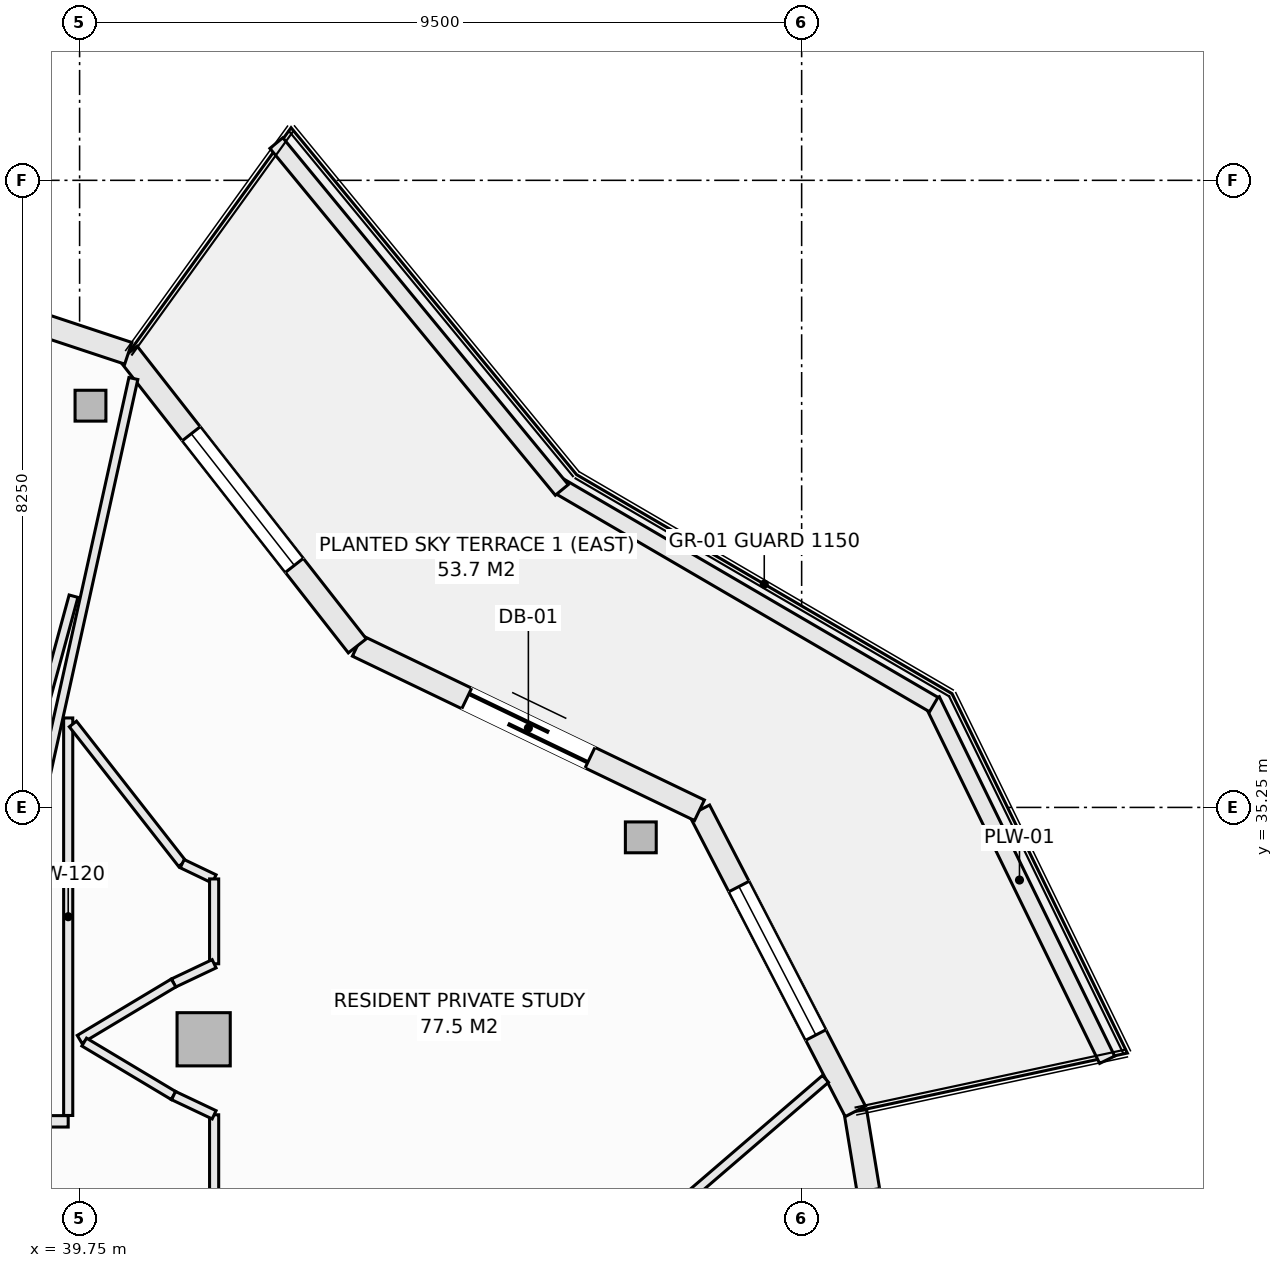
"""IFC4 building model, lengths in metres.
Left out: names, types, materials, properties, quantities, classifications, styles, units other than length and angle.
Written with IfcOpenShell. Run it as: python <this file> out.ifc"""

import sys

from ifc_helpers import new_model, si_unit, direction, frame, frame_2d, origin, origin_2d, place, context, subcontext, project, spatial, rectangle, hollow_rectangle, extrude, element, fill, save


model = new_model("IFC4")
c1 = context("Model", 3, precision=1e-05, world=origin(), true_north=direction((0.0, 1.0)))
c2 = subcontext(c1, "Body", "Model", "MODEL_VIEW")
j1 = project(units=[si_unit("LENGTHUNIT", "METRE"), si_unit("PLANEANGLEUNIT", "RADIAN")], contexts=[c1])
p1 = place(None, origin())
s1 = spatial("IfcSite", under=j1, at=p1, CompositionType="ELEMENT")
p2 = place(p1, origin())
s2 = spatial("IfcBuilding", under=s1, at=p2, CompositionType="ELEMENT")
p3 = place(p2, frame((0.0, 0.0, 259.1)))
s3 = spatial("IfcBuildingStorey", under=s2, at=p3, CompositionType="ELEMENT", Elevation=259.1)
for number, where, z_axis, x_axis in (
    (1, (47.134, 34.856, -0.27), (0.0, 0.0, 1.0), (1.0, 0.0, 0.0)),
    (2, (39.893, 40.535, -0.27), (0.0, 0.0, 1.0), (1.0, 0.0, 0.0)),
):
    element("IfcColumn", number, at=place(p3, frame(where, z_axis=z_axis, x_axis=x_axis)), inside=s3, PredefinedType="COLUMN", context=c2, shape_type="SweptSolid", body=[
        extrude(hollow_rectangle(XDim=0.406, YDim=0.406, WallThickness=0.016, at=origin_2d()), origin(), (0.0, 0.0, 1.0), 3.3),
    ])
p4 = place(p3, frame((41.382, 32.199, -0.27), z_axis=(0.0, 0.0, 1.0), x_axis=(1.0, 0.0, 0.0)))
e3 = element("IfcColumn", 3, at=p4, inside=s3, PredefinedType="COLUMN", context=c2, shape_type="SweptSolid", body=[
    extrude(rectangle(XDim=0.7, YDim=0.7, at=origin_2d()), origin(), (0.0, 0.0, 1.0), 3.3),
])
p5 = place(p3, frame((49.957, 31.251, 0.0), z_axis=(0.0, 0.0, 1.0), x_axis=(0.162404622434, -0.98672424649, 0.0)))
e4 = element("IfcWall", 4, at=p5, inside=s3, PredefinedType="SOLIDWALL", context=c2, shape_type="SweptSolid", body=[
    extrude(rectangle(XDim=4.308, YDim=0.3, at=frame_2d((2.154, 0.0))), origin(), (0.0, 0.0, 1.0), 2.605),
])
p6 = place(p5, frame((1.054, 0.0, 0.72)))
e5 = element("IfcOpeningElement", 5, at=p6, cuts=e4, PredefinedType="OPENING", context=c2, shape_type="SweptSolid", body=[
    extrude(rectangle(XDim=2.2, YDim=1.65, at=frame_2d((1.1, 0.825))), frame((0.0, 0.16, 0.0), z_axis=(0.0, -1.0, 0.0), x_axis=(1.0, 0.0, 0.0)), (0.0, 0.0, 1.0), 0.32),
])
p7 = place(p3, frame((47.906, 35.212, 0.0), z_axis=(0.0, 0.0, 1.0), x_axis=(0.459801070243, -0.888021945564, 0.0)))
e6 = element("IfcWall", 6, at=p7, inside=s3, PredefinedType="SOLIDWALL", context=c2, shape_type="SweptSolid", body=[
    extrude(rectangle(XDim=4.461, YDim=0.3, at=frame_2d((2.23, 0.0))), origin(), (0.0, 0.0, 1.0), 2.605),
])
p8 = place(p7, frame((1.13, 0.0, 0.72)))
e7 = element("IfcOpeningElement", 7, at=p8, cuts=e6, PredefinedType="OPENING", context=c2, shape_type="SweptSolid", body=[
    extrude(rectangle(XDim=2.2, YDim=1.65, at=frame_2d((1.1, 0.825))), frame((0.0, 0.16, 0.0), z_axis=(0.0, -1.0, 0.0), x_axis=(1.0, 0.0, 0.0)), (0.0, 0.0, 1.0), 0.32),
])
p9 = place(p3, frame((43.404, 37.375, 0.0), z_axis=(0.0, 0.0, 1.0), x_axis=(0.901346013132, -0.433099716706, 0.0)))
e8 = element("IfcWall", 8, at=p9, inside=s3, PredefinedType="SOLIDWALL", context=c2, shape_type="SweptSolid", body=[
    extrude(rectangle(XDim=4.994, YDim=0.3, at=frame_2d((2.497, 0.0))), origin(), (0.0, 0.0, 1.0), 2.605),
])
p10 = place(p9, frame((1.597, 0.0, 0.0)))
e9 = element("IfcOpeningElement", 9, at=p10, cuts=e8, PredefinedType="OPENING", context=c2, shape_type="SweptSolid", body=[
    extrude(rectangle(XDim=1.8, YDim=2.25, at=frame_2d((0.9, 1.125))), frame((0.0, 0.16, 0.0), z_axis=(0.0, -1.0, 0.0), x_axis=(1.0, 0.0, 0.0)), (0.0, 0.0, 1.0), 0.32),
])
p11 = place(p3, frame((40.391, 41.225, 0.0), z_axis=(0.0, 0.0, 1.0), x_axis=(0.616413297421, -0.78742278781, 0.0)))
e10 = element("IfcWall", 10, at=p11, inside=s3, PredefinedType="SOLIDWALL", context=c2, shape_type="SweptSolid", body=[
    extrude(rectangle(XDim=4.888, YDim=0.3, at=frame_2d((2.444, 0.0))), origin(), (0.0, 0.0, 1.0), 2.605),
])
p12 = place(p11, frame((1.344, 0.0, 0.72)))
e11 = element("IfcOpeningElement", 11, at=p12, cuts=e10, PredefinedType="OPENING", context=c2, shape_type="SweptSolid", body=[
    extrude(rectangle(XDim=2.2, YDim=1.65, at=frame_2d((1.1, 0.825))), frame((0.0, 0.16, 0.0), z_axis=(0.0, -1.0, 0.0), x_axis=(1.0, 0.0, 0.0)), (0.0, 0.0, 1.0), 0.32),
])
p13 = place(p3, frame((35.439, 42.865, 0.0), z_axis=(0.0, 0.0, 1.0), x_axis=(0.949252744709, -0.314514271001, 0.0)))
e12 = element("IfcWall", 12, at=p13, inside=s3, PredefinedType="SOLIDWALL", context=c2, shape_type="SweptSolid", body=[
    extrude(rectangle(XDim=5.216, YDim=0.3, at=frame_2d((2.608, 0.0))), origin(), (0.0, 0.0, 1.0), 2.605),
])
p14 = place(p13, frame((1.508, 0.0, 0.72)))
e13 = element("IfcOpeningElement", 13, at=p14, cuts=e12, PredefinedType="OPENING", context=c2, shape_type="SweptSolid", body=[
    extrude(rectangle(XDim=2.2, YDim=1.65, at=frame_2d((1.1, 0.825))), frame((0.0, 0.16, 0.0), z_axis=(0.0, -1.0, 0.0), x_axis=(1.0, 0.0, 0.0)), (0.0, 0.0, 1.0), 0.32),
])
p15 = place(p3, frame((50.962, 36.659, 0.0), z_axis=(0.0, 0.0, 1.0), x_axis=(0.438469339137, -0.898746148051, 0.0)))
e14 = element("IfcWall", 14, at=p15, inside=s3, PredefinedType="PARAPET", context=c2, shape_type="SweptSolid", body=[
    extrude(rectangle(XDim=5.262, YDim=0.22, at=frame_2d((2.631, 0.0))), origin(), (0.0, 0.0, 1.0), 0.52),
])
p16 = place(p3, frame((46.048, 39.485, 0.0), z_axis=(0.0, 0.0, 1.0), x_axis=(0.863803671285, -0.503828559606, 0.0)))
e15 = element("IfcWall", 15, at=p16, inside=s3, PredefinedType="PARAPET", context=c2, shape_type="SweptSolid", body=[
    extrude(rectangle(XDim=5.719, YDim=0.22, at=frame_2d((2.86, 0.0))), origin(), (0.0, 0.0, 1.0), 0.52),
])
p17 = place(p3, frame((42.339, 43.99, 0.0), z_axis=(0.0, 0.0, 1.0), x_axis=(0.635450933862, -0.772141250455, 0.0)))
e16 = element("IfcWall", 16, at=p17, inside=s3, PredefinedType="PARAPET", context=c2, shape_type="SweptSolid", body=[
    extrude(rectangle(XDim=5.91, YDim=0.22, at=frame_2d((2.955, 0.0))), origin(), (0.0, 0.0, 1.0), 0.52),
])
p18 = place(p3, frame((38.862, 31.12, 0.0), z_axis=(0.0, 0.0, 1.0), x_axis=(1.0, 0.0, 0.0)))
e17 = element("IfcWall", 17, at=p18, inside=s3, PredefinedType="PARTITIONING", context=c2, shape_type="SweptSolid", body=[
    extrude(rectangle(XDim=0.738, YDim=0.15, at=frame_2d((0.369, 0.0))), origin(), (0.0, 0.0, 1.0), 3.03),
])
p19 = place(p3, frame((39.6, 31.197, 0.0), z_axis=(0.0, 0.0, 1.0), x_axis=(0.0, 1.0, 0.0)))
e18 = element("IfcWall", 18, at=p19, inside=s3, PredefinedType="PARTITIONING", context=c2, shape_type="SweptSolid", body=[
    extrude(rectangle(XDim=5.23, YDim=0.12, at=frame_2d((2.615, 0.0))), origin(), (0.0, 0.0, 1.0), 3.03),
])
p20 = place(p3, frame((39.662, 36.348, 0.0), z_axis=(0.0, 0.0, 1.0), x_axis=(0.616212345115, -0.78758005671, 0.0)))
e19 = element("IfcWall", 19, at=p20, inside=s3, PredefinedType="PARTITIONING", context=c2, shape_type="SweptSolid", body=[
    extrude(rectangle(XDim=2.333, YDim=0.12, at=frame_2d((1.167, 0.0))), origin(), (0.0, 0.0, 1.0), 3.03),
])
p21 = place(p3, frame((41.1, 34.51, 0.0), z_axis=(0.0, 0.0, 1.0), x_axis=(0.902054328377, -0.431622507125, 0.0)))
e20 = element("IfcWall", 20, at=p21, inside=s3, PredefinedType="PARTITIONING", context=c2, shape_type="SweptSolid", body=[
    extrude(rectangle(XDim=0.466, YDim=0.12, at=frame_2d((0.233, 0.0))), origin(), (0.0, 0.0, 1.0), 3.03),
])
p22 = place(p3, frame((41.52, 22.794, 0.0), z_axis=(0.0, 0.0, 1.0), x_axis=(0.0, 1.0, 0.0)))
e21 = element("IfcWall", 21, at=p22, inside=s3, PredefinedType="PARTITIONING", context=c2, shape_type="SweptSolid", body=[
    extrude(rectangle(XDim=8.412, YDim=0.12, at=frame_2d((4.206, 0.0))), origin(), (0.0, 0.0, 1.0), 2.478),
])
p23 = place(p22, frame((0.752, 0.0, 0.0)))
e22 = element("IfcOpeningElement", 22, at=p23, cuts=e21, PredefinedType="OPENING", context=c2, shape_type="SweptSolid", body=[
    extrude(rectangle(XDim=0.95, YDim=2.1, at=frame_2d((0.475, 1.05))), frame((0.0, 0.07, 0.0), z_axis=(0.0, -1.0, 0.0), x_axis=(1.0, 0.0, 0.0)), (0.0, 0.0, 1.0), 0.14),
])
p24 = place(p22, frame((5.031, 0.0, 0.0)))
e23 = element("IfcOpeningElement", 23, at=p24, cuts=e21, PredefinedType="OPENING", context=c2, shape_type="SweptSolid", body=[
    extrude(rectangle(XDim=0.95, YDim=2.1, at=frame_2d((0.475, 1.05))), frame((0.0, 0.07, 0.0), z_axis=(0.0, -1.0, 0.0), x_axis=(1.0, 0.0, 0.0)), (0.0, 0.0, 1.0), 0.14),
])
p25 = place(p3, frame((41.52, 33.193, 0.0), z_axis=(0.0, 0.0, 1.0), x_axis=(0.0, 1.0, 0.0)))
e24 = element("IfcWall", 24, at=p25, inside=s3, PredefinedType="PARTITIONING", context=c2, shape_type="SweptSolid", body=[
    extrude(rectangle(XDim=1.116, YDim=0.12, at=frame_2d((0.558, 0.0))), origin(), (0.0, 0.0, 1.0), 3.03),
])
p26 = place(p3, frame((40.986, 32.94, 0.0), z_axis=(0.0, 0.0, 1.0), x_axis=(0.90356951601, 0.428441512621, 0.0)))
e25 = element("IfcWall", 25, at=p26, inside=s3, PredefinedType="PARTITIONING", context=c2, shape_type="SweptSolid", body=[
    extrude(rectangle(XDim=0.591, YDim=0.12, at=frame_2d((0.295, 0.0))), origin(), (0.0, 0.0, 1.0), 3.03),
])
p27 = place(p3, frame((39.75, 32.199, 0.0), z_axis=(0.0, 0.0, 1.0), x_axis=(0.857702120906, 0.514146935996, 0.0)))
e26 = element("IfcWall", 26, at=p27, inside=s3, PredefinedType="PARTITIONING", context=c2, shape_type="SweptSolid", body=[
    extrude(rectangle(XDim=1.441, YDim=0.12, at=frame_2d((0.721, 0.0))), origin(), (0.0, 0.0, 1.0), 3.03),
])
p28 = place(p3, frame((39.81, 32.163, 0.0), z_axis=(0.0, 0.0, 1.0), x_axis=(0.858011245414, -0.513630901273, 0.0)))
e27 = element("IfcWall", 27, at=p28, inside=s3, PredefinedType="PARTITIONING", context=c2, shape_type="SweptSolid", body=[
    extrude(rectangle(XDim=1.37, YDim=0.12, at=frame_2d((0.685, 0.0))), origin(), (0.0, 0.0, 1.0), 3.03),
])
p29 = place(p3, frame((40.986, 31.459, 0.0), z_axis=(0.0, 0.0, 1.0), x_axis=(0.903729424576, -0.428104107847, 0.0)))
e28 = element("IfcWall", 28, at=p29, inside=s3, PredefinedType="PARTITIONING", context=c2, shape_type="SweptSolid", body=[
    extrude(rectangle(XDim=0.591, YDim=0.12, at=frame_2d((0.295, 0.0))), origin(), (0.0, 0.0, 1.0), 3.03),
])
p30 = place(p3, frame((41.582, 24.814, 0.0), z_axis=(0.0, 0.0, 1.0), x_axis=(0.758204685581, 0.652016606202, 0.0)))
e29 = element("IfcWall", 29, at=p30, inside=s3, PredefinedType="PARTITIONING", context=c2, shape_type="SweptSolid", body=[
    extrude(rectangle(XDim=10.528, YDim=0.12, at=frame_2d((5.264, 0.0))), origin(), (0.0, 0.0, 1.0), 2.478),
])
p31 = place(p3, frame((39.172, 35.083, 0.0), z_axis=(0.0, 0.0, 1.0), x_axis=(0.216048361883, 0.976382663369, 0.0)))
e30 = element("IfcWall", 30, at=p31, inside=s3, PredefinedType="PARTITIONING", context=c2, shape_type="SweptSolid", body=[
    extrude(rectangle(XDim=5.95, YDim=0.12, at=frame_2d((2.975, 0.0))), origin(), (0.0, 0.0, 1.0), 3.03),
])
p32 = place(p3, frame((39.05, 35.75, 0.0), z_axis=(0.0, 0.0, 1.0), x_axis=(0.262548848822, 0.964918702266, 0.0)))
e31 = element("IfcWall", 31, at=p32, inside=s3, PredefinedType="PARTITIONING", context=c2, shape_type="SweptSolid", body=[
    extrude(rectangle(XDim=2.362, YDim=0.12, at=frame_2d((1.181, 0.0))), origin(), (0.0, 0.0, 1.0), 3.03),
])
p33 = place(p8, origin())
e32 = element("IfcWindow", 32, at=p33, inside=s3, PartitioningType="SINGLE_PANEL", PredefinedType="WINDOW", context=c2, shape_type="SweptSolid", body=[
    extrude(rectangle(XDim=2.2, YDim=1.65, at=frame_2d((1.1, 0.825))), frame((0.0, 0.03, 0.0), z_axis=(0.0, -1.0, 0.0), x_axis=(1.0, 0.0, 0.0)), (0.0, 0.0, 1.0), 0.06),
])
fill(e7, e32)
p34 = place(p10, origin())
e33 = element("IfcDoor", 33, at=p34, inside=s3, OperationType="SLIDING_TO_LEFT", PredefinedType="DOOR", context=c2, shape_type="SweptSolid", body=[
    extrude(rectangle(XDim=1.8, YDim=2.25, at=frame_2d((0.9, 1.125))), frame((0.0, 0.025, 0.0), z_axis=(0.0, -1.0, 0.0), x_axis=(1.0, 0.0, 0.0)), (0.0, 0.0, 1.0), 0.05),
])
fill(e9, e33)
p35 = place(p12, origin())
e34 = element("IfcWindow", 34, at=p35, inside=s3, PartitioningType="SINGLE_PANEL", PredefinedType="WINDOW", context=c2, shape_type="SweptSolid", body=[
    extrude(rectangle(XDim=2.2, YDim=1.65, at=frame_2d((1.1, 0.825))), frame((0.0, 0.03, 0.0), z_axis=(0.0, -1.0, 0.0), x_axis=(1.0, 0.0, 0.0)), (0.0, 0.0, 1.0), 0.06),
])
fill(e11, e34)
save(model, sys.argv[1])
